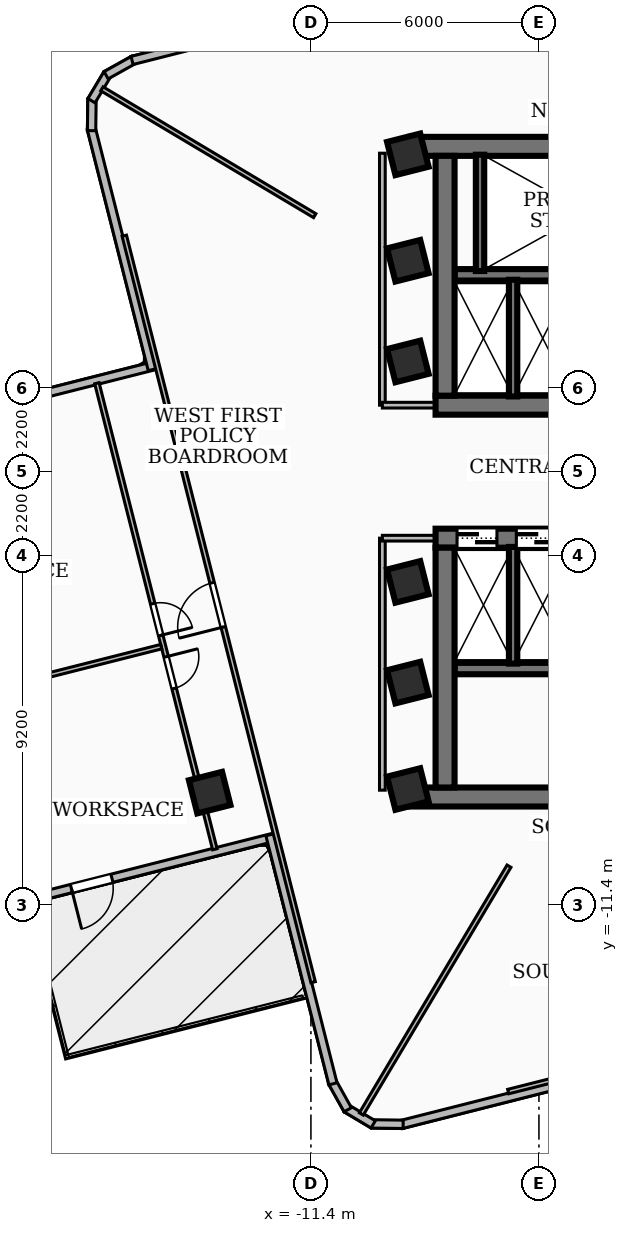
"""IFC4 building model, lengths in metres.
Left out: names, types, materials, properties, quantities, classifications, styles, units other than length and angle.
Written with IfcOpenShell. Run it as: python <this file> out.ifc"""

import sys

from ifc_helpers import new_model, si_unit, direction, frame, frame_2d, origin, origin_2d, place, context, subcontext, project, spatial, rectangle, extrude, element, fill, save


model = new_model("IFC4")
c1 = context("Model", 3, precision=1e-05, world=origin(), true_north=direction((0.0, 1.0)))
c2 = subcontext(c1, "Body", "Model", "MODEL_VIEW")
j1 = project(units=[si_unit("LENGTHUNIT", "METRE"), si_unit("PLANEANGLEUNIT", "RADIAN")], contexts=[c1])
p1 = place(None, origin())
s1 = spatial("IfcSite", under=j1, at=p1, CompositionType="ELEMENT")
p2 = place(p1, origin())
s2 = spatial("IfcBuilding", under=s1, at=p2, CompositionType="ELEMENT")
p3 = place(p2, frame((0.0, 0.0, 130.68)))
s3 = spatial("IfcBuildingStorey", under=s2, at=p3, CompositionType="ELEMENT", Elevation=130.68)
p4 = place(p3, frame((-8.78, 8.56, 0.0), z_axis=(0.0, 0.0, 1.0), x_axis=(1.0, 0.0, 0.0)))
e1 = element("IfcWall", 1, at=p4, inside=s3, PredefinedType="SHEAR", context=c2, shape_type="SweptSolid", body=[
    extrude(rectangle(XDim=17.56, YDim=0.5, at=frame_2d((8.78, 0.0))), origin(), (0.0, 0.0, 1.0), 3.32),
])
p5 = place(p3, frame((8.12, 1.75, 0.0), z_axis=(0.0, 0.0, 1.0), x_axis=(-1.0, 0.0, 0.0)))
e2 = element("IfcWall", 2, at=p5, inside=s3, PredefinedType="SHEAR", context=c2, shape_type="SweptSolid", body=[
    extrude(rectangle(XDim=16.24, YDim=0.5, at=frame_2d((8.12, 0.0))), origin(), (0.0, 0.0, 1.0), 3.32),
])
p6 = place(p5, frame((7.45, 0.0, 0.0)))
e3 = element("IfcOpeningElement", 3, at=p6, cuts=e2, PredefinedType="OPENING", context=c2, shape_type="SweptSolid", body=[
    extrude(rectangle(XDim=1.0, YDim=2.1, at=frame_2d((0.5, 1.05))), frame((0.0, 0.26, 0.0), z_axis=(0.0, -1.0, 0.0), x_axis=(1.0, 0.0, 0.0)), (0.0, 0.0, 1.0), 0.52),
])
p7 = place(p5, frame((3.85, 0.0, 0.0)))
e4 = element("IfcOpeningElement", 4, at=p7, cuts=e2, PredefinedType="OPENING", context=c2, shape_type="SweptSolid", body=[
    extrude(rectangle(XDim=0.9, YDim=2.06, at=frame_2d((0.45, 1.03))), frame((0.0, 0.26, 0.0), z_axis=(0.0, -1.0, 0.0), x_axis=(1.0, 0.0, 0.0)), (0.0, 0.0, 1.0), 0.52),
])
p8 = place(p5, frame((2.35, 0.0, 0.0)))
e5 = element("IfcOpeningElement", 5, at=p8, cuts=e2, PredefinedType="OPENING", context=c2, shape_type="SweptSolid", body=[
    extrude(rectangle(XDim=0.9, YDim=2.06, at=frame_2d((0.45, 1.03))), frame((0.0, 0.26, 0.0), z_axis=(0.0, -1.0, 0.0), x_axis=(1.0, 0.0, 0.0)), (0.0, 0.0, 1.0), 0.52),
])
p9 = place(p5, frame((0.8, 0.0, 0.0)))
e6 = element("IfcOpeningElement", 6, at=p9, cuts=e2, PredefinedType="OPENING", context=c2, shape_type="SweptSolid", body=[
    extrude(rectangle(XDim=0.9, YDim=2.06, at=frame_2d((0.45, 1.03))), frame((0.0, 0.26, 0.0), z_axis=(0.0, -1.0, 0.0), x_axis=(1.0, 0.0, 0.0)), (0.0, 0.0, 1.0), 0.52),
])
p10 = place(p3, frame((-7.87, 2.0, 0.0), z_axis=(0.0, 0.0, 1.0), x_axis=(0.0, 1.0, 0.0)))
e7 = element("IfcWall", 7, at=p10, inside=s3, PredefinedType="SHEAR", context=c2, shape_type="SweptSolid", body=[
    extrude(rectangle(XDim=6.31, YDim=0.5, at=frame_2d((3.155, 0.0))), origin(), (0.0, 0.0, 1.0), 3.32),
])
p11 = place(p3, frame((7.62, 5.18, 0.0), z_axis=(0.0, 0.0, 1.0), x_axis=(-1.0, 0.0, 0.0)))
e8 = element("IfcWall", 8, at=p11, inside=s3, PredefinedType="SOLIDWALL", context=c2, shape_type="SweptSolid", body=[
    extrude(rectangle(XDim=15.24, YDim=0.3, at=frame_2d((7.62, 0.0))), origin(), (0.0, 0.0, 1.0), 3.32),
])
p12 = place(p11, frame((5.77, 0.0, 0.0)))
e9 = element("IfcOpeningElement", 9, at=p12, cuts=e8, PredefinedType="OPENING", context=c2, shape_type="SweptSolid", body=[
    extrude(rectangle(XDim=1.1, YDim=2.15, at=frame_2d((0.55, 1.075))), frame((0.0, 0.16, 0.0), z_axis=(0.0, -1.0, 0.0), x_axis=(1.0, 0.0, 0.0)), (0.0, 0.0, 1.0), 0.32),
])
p13 = place(p11, frame((2.97, 0.0, 0.0)))
e10 = element("IfcOpeningElement", 10, at=p13, cuts=e8, PredefinedType="OPENING", context=c2, shape_type="SweptSolid", body=[
    extrude(rectangle(XDim=1.1, YDim=2.15, at=frame_2d((0.55, 1.075))), frame((0.0, 0.16, 0.0), z_axis=(0.0, -1.0, 0.0), x_axis=(1.0, 0.0, 0.0)), (0.0, 0.0, 1.0), 0.32),
])
p14 = place(p11, frame((7.97, 0.0, 0.0)))
e11 = element("IfcOpeningElement", 11, at=p14, cuts=e8, PredefinedType="OPENING", context=c2, shape_type="SweptSolid", body=[
    extrude(rectangle(XDim=1.0, YDim=2.1, at=frame_2d((0.5, 1.05))), frame((0.0, 0.16, 0.0), z_axis=(0.0, -1.0, 0.0), x_axis=(1.0, 0.0, 0.0)), (0.0, 0.0, 1.0), 0.32),
])
p15 = place(p3, frame((8.78, -8.56, 0.0), z_axis=(0.0, 0.0, 1.0), x_axis=(-1.0, 0.0, 0.0)))
e12 = element("IfcWall", 12, at=p15, inside=s3, PredefinedType="SHEAR", context=c2, shape_type="SweptSolid", body=[
    extrude(rectangle(XDim=17.56, YDim=0.5, at=frame_2d((8.78, 0.0))), origin(), (0.0, 0.0, 1.0), 3.32),
])
p16 = place(p3, frame((-8.12, -1.75, 0.0), z_axis=(0.0, 0.0, 1.0), x_axis=(1.0, 0.0, 0.0)))
e13 = element("IfcWall", 13, at=p16, inside=s3, PredefinedType="SHEAR", context=c2, shape_type="SweptSolid", body=[
    extrude(rectangle(XDim=16.24, YDim=0.5, at=frame_2d((8.12, 0.0))), origin(), (0.0, 0.0, 1.0), 3.32),
])
p17 = place(p16, frame((7.45, 0.0, 0.0)))
e14 = element("IfcOpeningElement", 14, at=p17, cuts=e13, PredefinedType="OPENING", context=c2, shape_type="SweptSolid", body=[
    extrude(rectangle(XDim=1.0, YDim=2.1, at=frame_2d((0.5, 1.05))), frame((0.0, 0.26, 0.0), z_axis=(0.0, -1.0, 0.0), x_axis=(1.0, 0.0, 0.0)), (0.0, 0.0, 1.0), 0.52),
])
p18 = place(p16, frame((12.65, 0.0, 0.0)))
e15 = element("IfcOpeningElement", 15, at=p18, cuts=e13, PredefinedType="OPENING", context=c2, shape_type="SweptSolid", body=[
    extrude(rectangle(XDim=0.9, YDim=2.06, at=frame_2d((0.45, 1.03))), frame((0.0, 0.26, 0.0), z_axis=(0.0, -1.0, 0.0), x_axis=(1.0, 0.0, 0.0)), (0.0, 0.0, 1.0), 0.52),
])
p19 = place(p16, frame((0.565, 0.0, 0.0)))
e16 = element("IfcOpeningElement", 16, at=p19, cuts=e13, PredefinedType="OPENING", context=c2, shape_type="SweptSolid", body=[
    extrude(rectangle(XDim=1.05, YDim=2.15, at=frame_2d((0.525, 1.075))), frame((0.0, 0.26, 0.0), z_axis=(0.0, -1.0, 0.0), x_axis=(1.0, 0.0, 0.0)), (0.0, 0.0, 1.0), 0.52),
])
p20 = place(p16, frame((2.125, 0.0, 0.0)))
e17 = element("IfcOpeningElement", 17, at=p20, cuts=e13, PredefinedType="OPENING", context=c2, shape_type="SweptSolid", body=[
    extrude(rectangle(XDim=1.05, YDim=2.15, at=frame_2d((0.525, 1.075))), frame((0.0, 0.26, 0.0), z_axis=(0.0, -1.0, 0.0), x_axis=(1.0, 0.0, 0.0)), (0.0, 0.0, 1.0), 0.52),
])
p21 = place(p16, frame((3.685, 0.0, 0.0)))
e18 = element("IfcOpeningElement", 18, at=p21, cuts=e13, PredefinedType="OPENING", context=c2, shape_type="SweptSolid", body=[
    extrude(rectangle(XDim=1.05, YDim=2.15, at=frame_2d((0.525, 1.075))), frame((0.0, 0.26, 0.0), z_axis=(0.0, -1.0, 0.0), x_axis=(1.0, 0.0, 0.0)), (0.0, 0.0, 1.0), 0.52),
])
p22 = place(p3, frame((-7.87, -8.31, 0.0), z_axis=(0.0, 0.0, 1.0), x_axis=(0.0, 1.0, 0.0)))
e19 = element("IfcWall", 19, at=p22, inside=s3, PredefinedType="SHEAR", context=c2, shape_type="SweptSolid", body=[
    extrude(rectangle(XDim=6.31, YDim=0.5, at=frame_2d((3.155, 0.0))), origin(), (0.0, 0.0, 1.0), 3.32),
])
p23 = place(p3, frame((-7.62, -5.18, 0.0), z_axis=(0.0, 0.0, 1.0), x_axis=(1.0, 0.0, 0.0)))
e20 = element("IfcWall", 20, at=p23, inside=s3, PredefinedType="SOLIDWALL", context=c2, shape_type="SweptSolid", body=[
    extrude(rectangle(XDim=15.24, YDim=0.3, at=frame_2d((7.62, 0.0))), origin(), (0.0, 0.0, 1.0), 3.32),
])
p24 = place(p23, frame((5.77, 0.0, 0.0)))
e21 = element("IfcOpeningElement", 21, at=p24, cuts=e20, PredefinedType="OPENING", context=c2, shape_type="SweptSolid", body=[
    extrude(rectangle(XDim=1.1, YDim=2.15, at=frame_2d((0.55, 1.075))), frame((0.0, 0.16, 0.0), z_axis=(0.0, -1.0, 0.0), x_axis=(1.0, 0.0, 0.0)), (0.0, 0.0, 1.0), 0.32),
])
p25 = place(p23, frame((7.97, 0.0, 0.0)))
e22 = element("IfcOpeningElement", 22, at=p25, cuts=e20, PredefinedType="OPENING", context=c2, shape_type="SweptSolid", body=[
    extrude(rectangle(XDim=1.0, YDim=2.1, at=frame_2d((0.5, 1.05))), frame((0.0, 0.16, 0.0), z_axis=(0.0, -1.0, 0.0), x_axis=(1.0, 0.0, 0.0)), (0.0, 0.0, 1.0), 0.32),
])
p26 = place(p3, frame((-6.95, 5.28, 0.0), z_axis=(0.0, 0.0, 1.0), x_axis=(0.0, 1.0, 0.0)))
e23 = element("IfcWall", 23, at=p26, inside=s3, PredefinedType="SOLIDWALL", context=c2, shape_type="SweptSolid", body=[
    extrude(rectangle(XDim=3.06, YDim=0.22, at=frame_2d((1.53, 0.0))), origin(), (0.0, 0.0, 1.0), 3.32),
])
for number, where, z_axis, x_axis in (
    (24, (-6.08, 1.98, 0.0), (0.0, 0.0, 1.0), (0.0, 1.0, 0.0)),
    (25, (-6.08, -5.05, 0.0), (0.0, 0.0, 1.0), (0.0, 1.0, 0.0)),
):
    element("IfcWall", number, at=place(p3, frame(where, z_axis=z_axis, x_axis=x_axis)), inside=s3, PredefinedType="SOLIDWALL", context=c2, shape_type="SweptSolid", body=[
        extrude(rectangle(XDim=3.07, YDim=0.22, at=frame_2d((1.535, 0.0))), origin(), (0.0, 0.0, 1.0), 3.32),
    ])
for number, where, z_axis, x_axis in (
    (26, (-8.85, -5.55, 0.0), (0.0, 0.0, 1.0), (0.969, 0.245, 0.0)),
    (27, (-8.85, -2.9, 0.0), (0.0, 0.0, 1.0), (0.969, 0.245, 0.0)),
    (28, (-8.85, 2.9, 0.0), (0.0, 0.0, 1.0), (0.969, 0.245, 0.0)),
    (29, (-8.85, 5.55, 0.0), (0.0, 0.0, 1.0), (0.969, 0.245, 0.0)),
    (30, (-8.85, 8.35, 0.0), (0.0, 0.0, 1.0), (0.969, 0.245, 0.0)),
    (31, (-8.85, -8.35, 0.0), (0.0, 0.0, 1.0), (0.969, 0.245, 0.0)),
    (32, (-14.064, -8.445, 0.0), (0.0, 0.0, 1.0), (0.969, 0.245, 0.0)),
):
    element("IfcColumn", number, at=place(p3, frame(where, z_axis=z_axis, x_axis=x_axis)), inside=s3, PredefinedType="COLUMN", context=c2, shape_type="SweptSolid", body=[
        extrude(rectangle(XDim=0.9, YDim=0.9, at=origin_2d()), origin(), (0.0, 0.0, 1.0), 3.6),
    ])
p27 = place(p3, frame((-12.371, -9.618, 0.0), z_axis=(0.0, 0.0, 1.0), x_axis=(-0.969434127448, -0.245351732293, 0.0)))
e33 = element("IfcWall", 33, at=p27, inside=s3, PredefinedType="SOLIDWALL", context=c2, shape_type="SweptSolid", body=[
    extrude(rectangle(XDim=13.458, YDim=0.22, at=frame_2d((6.729, 0.0))), origin(), (0.0, 0.0, 1.0), 3.32),
])
p28 = place(p27, frame((4.4, 0.0, 0.0)))
e34 = element("IfcOpeningElement", 34, at=p28, cuts=e33, PredefinedType="OPENING", context=c2, shape_type="SweptSolid", body=[
    extrude(rectangle(XDim=1.1, YDim=2.1, at=frame_2d((0.55, 1.05))), frame((0.0, 0.12, 0.0), z_axis=(0.0, -1.0, 0.0), x_axis=(1.0, 0.0, 0.0)), (0.0, 0.0, 1.0), 0.24),
])
p29 = place(p3, frame((-28.557, -0.511, 0.0), z_axis=(0.0, 0.0, 1.0), x_axis=(0.969429758912, 0.245368992613, 0.0)))
e35 = element("IfcWall", 35, at=p29, inside=s3, PredefinedType="SOLIDWALL", context=c2, shape_type="SweptSolid", body=[
    extrude(rectangle(XDim=13.457, YDim=0.22, at=frame_2d((6.729, 0.0))), origin(), (0.0, 0.0, 1.0), 3.32),
])
p30 = place(p29, frame((1.1, 0.0, 0.85)))
e36 = element("IfcOpeningElement", 36, at=p30, cuts=e35, PredefinedType="OPENING", context=c2, shape_type="SweptSolid", body=[
    extrude(rectangle(XDim=2.4, YDim=2.1, at=frame_2d((1.2, 1.05))), frame((0.0, 0.12, 0.0), z_axis=(0.0, -1.0, 0.0), x_axis=(1.0, 0.0, 0.0)), (0.0, 0.0, 1.0), 0.24),
])
p31 = place(p3, frame((-15.574, 2.684, 0.0), z_axis=(0.0, 0.0, 1.0), x_axis=(-0.245346347134, 0.969435490349, 0.0)))
e37 = element("IfcWall", 37, at=p31, inside=s3, PredefinedType="SOLIDWALL", context=c2, shape_type="SweptSolid", body=[
    extrude(rectangle(XDim=6.538, YDim=0.22, at=frame_2d((3.269, 0.0))), origin(), (0.0, 0.0, 1.0), 3.32),
])
p32 = place(p3, frame((-17.172, 8.973, 0.0), z_axis=(0.0, 0.0, 1.0), x_axis=(0.013464821393, 0.999909345183, 0.0)))
e38 = element("IfcWall", 38, at=p32, inside=s3, PredefinedType="SOLIDWALL", context=c2, shape_type="SweptSolid", body=[
    extrude(rectangle(XDim=0.834, YDim=0.22, at=frame_2d((0.417, 0.0))), origin(), (0.0, 0.0, 1.0), 3.32),
])
p33 = place(p3, frame((-17.174, 9.761, 0.0), z_axis=(0.0, 0.0, 1.0), x_axis=(0.512960801038, 0.858412031951, 0.0)))
e39 = element("IfcWall", 39, at=p33, inside=s3, PredefinedType="SOLIDWALL", context=c2, shape_type="SweptSolid", body=[
    extrude(rectangle(XDim=0.819, YDim=0.22, at=frame_2d((0.41, 0.0))), origin(), (0.0, 0.0, 1.0), 3.32),
])
p34 = place(p3, frame((-16.789, 10.431, 0.0), z_axis=(0.0, 0.0, 1.0), x_axis=(0.872870149311, 0.487952561671, 0.0)))
e40 = element("IfcWall", 40, at=p34, inside=s3, PredefinedType="SOLIDWALL", context=c2, shape_type="SweptSolid", body=[
    extrude(rectangle(XDim=0.834, YDim=0.22, at=frame_2d((0.417, 0.0))), origin(), (0.0, 0.0, 1.0), 3.32),
])
p35 = place(p3, frame((-16.107, 10.82, 0.0), z_axis=(0.0, 0.0, 1.0), x_axis=(0.969443674581, 0.245314006561, 0.0)))
e41 = element("IfcWall", 41, at=p35, inside=s3, PredefinedType="SOLIDWALL", context=c2, shape_type="SweptSolid", body=[
    extrude(rectangle(XDim=6.759, YDim=0.22, at=frame_2d((3.379, 0.0))), origin(), (0.0, 0.0, 1.0), 3.32),
])
p36 = place(p3, frame((-2.684, -15.574, 0.0), z_axis=(0.0, 0.0, 1.0), x_axis=(-0.969435490349, -0.245346347134, 0.0)))
e42 = element("IfcWall", 42, at=p36, inside=s3, PredefinedType="SOLIDWALL", context=c2, shape_type="SweptSolid", body=[
    extrude(rectangle(XDim=6.538, YDim=0.22, at=frame_2d((3.269, 0.0))), origin(), (0.0, 0.0, 1.0), 2.55),
])
p37 = place(p3, frame((-8.973, -17.172, 0.0), z_axis=(0.0, 0.0, 1.0), x_axis=(-0.999909345183, 0.013464821393, 0.0)))
e43 = element("IfcWall", 43, at=p37, inside=s3, PredefinedType="SOLIDWALL", context=c2, shape_type="SweptSolid", body=[
    extrude(rectangle(XDim=0.834, YDim=0.22, at=frame_2d((0.417, 0.0))), origin(), (0.0, 0.0, 1.0), 3.32),
])
p38 = place(p3, frame((-9.761, -17.174, 0.0), z_axis=(0.0, 0.0, 1.0), x_axis=(-0.858412031951, 0.512960801038, 0.0)))
e44 = element("IfcWall", 44, at=p38, inside=s3, PredefinedType="SOLIDWALL", context=c2, shape_type="SweptSolid", body=[
    extrude(rectangle(XDim=0.819, YDim=0.22, at=frame_2d((0.41, 0.0))), origin(), (0.0, 0.0, 1.0), 3.32),
])
p39 = place(p3, frame((-10.431, -16.789, 0.0), z_axis=(0.0, 0.0, 1.0), x_axis=(-0.487952561671, 0.872870149311, 0.0)))
e45 = element("IfcWall", 45, at=p39, inside=s3, PredefinedType="SOLIDWALL", context=c2, shape_type="SweptSolid", body=[
    extrude(rectangle(XDim=0.834, YDim=0.22, at=frame_2d((0.417, 0.0))), origin(), (0.0, 0.0, 1.0), 3.32),
])
p40 = place(p3, frame((-10.82, -16.107, 0.0), z_axis=(0.0, 0.0, 1.0), x_axis=(-0.245314006561, 0.969443674581, 0.0)))
e46 = element("IfcWall", 46, at=p40, inside=s3, PredefinedType="SOLIDWALL", context=c2, shape_type="SweptSolid", body=[
    extrude(rectangle(XDim=6.759, YDim=0.22, at=frame_2d((3.379, 0.0))), origin(), (0.0, 0.0, 1.0), 3.32),
])
p41 = place(p3, frame((-9.52, 1.75, 0.0), z_axis=(0.0, 0.0, 1.0), x_axis=(0.0, 1.0, 0.0)))
e47 = element("IfcWall", 47, at=p41, inside=s3, PredefinedType="PARTITIONING", context=c2, shape_type="SweptSolid", body=[
    extrude(rectangle(XDim=6.63, YDim=0.15, at=frame_2d((3.315, 0.0))), origin(), (0.0, 0.0, 1.0), 2.55),
])
p42 = place(p3, frame((-7.85, 1.75, 0.0), z_axis=(0.0, 0.0, 1.0), x_axis=(-1.0, 0.0, 0.0)))
e48 = element("IfcWall", 48, at=p42, inside=s3, PredefinedType="PARTITIONING", context=c2, shape_type="SweptSolid", body=[
    extrude(rectangle(XDim=1.67, YDim=0.15, at=frame_2d((0.835, 0.0))), origin(), (0.0, 0.0, 1.0), 2.55),
])
p43 = place(p3, frame((-9.52, -8.38, 0.0), z_axis=(0.0, 0.0, 1.0), x_axis=(0.0, 1.0, 0.0)))
e49 = element("IfcWall", 49, at=p43, inside=s3, PredefinedType="PARTITIONING", context=c2, shape_type="SweptSolid", body=[
    extrude(rectangle(XDim=6.63, YDim=0.15, at=frame_2d((3.315, 0.0))), origin(), (0.0, 0.0, 1.0), 2.55),
])
p44 = place(p3, frame((-7.85, -1.75, 0.0), z_axis=(0.0, 0.0, 1.0), x_axis=(-1.0, 0.0, 0.0)))
e50 = element("IfcWall", 50, at=p44, inside=s3, PredefinedType="PARTITIONING", context=c2, shape_type="SweptSolid", body=[
    extrude(rectangle(XDim=1.67, YDim=0.15, at=frame_2d((0.835, 0.0))), origin(), (0.0, 0.0, 1.0), 2.55),
])
p45 = place(p3, frame((-11.3, 6.736, 0.0), z_axis=(0.0, 0.0, 1.0), x_axis=(-0.858979599017, 0.512009812868, 0.0)))
e51 = element("IfcWall", 51, at=p45, inside=s3, PredefinedType="PARTITIONING", context=c2, shape_type="SweptSolid", body=[
    extrude(rectangle(XDim=6.519, YDim=0.12, at=frame_2d((3.26, 0.0))), origin(), (0.0, 0.0, 1.0), 3.32),
])
p46 = place(p3, frame((-6.188, -10.38, 0.0), z_axis=(0.0, 0.0, 1.0), x_axis=(-0.511972353143, -0.859001926434, 0.0)))
e52 = element("IfcWall", 52, at=p46, inside=s3, PredefinedType="PARTITIONING", context=c2, shape_type="SweptSolid", body=[
    extrude(rectangle(XDim=7.59, YDim=0.12, at=frame_2d((3.795, 0.0))), origin(), (0.0, 0.0, 1.0), 2.55),
])
p47 = place(p3, frame((-11.342, -13.433, 0.0), z_axis=(0.0, 0.0, 1.0), x_axis=(-0.24525085526, 0.969459652587, 0.0)))
e53 = element("IfcWall", 53, at=p47, inside=s3, PredefinedType="PARTITIONING", context=c2, shape_type="SweptSolid", body=[
    extrude(rectangle(XDim=20.261, YDim=0.12, at=frame_2d((10.13, 0.0))), origin(), (0.0, 0.0, 1.0), 2.55),
])
p48 = place(p47, frame((9.64, 0.0, 0.0)))
e54 = element("IfcOpeningElement", 54, at=p48, cuts=e53, PredefinedType="OPENING", context=c2, shape_type="SweptSolid", body=[
    extrude(rectangle(XDim=1.2, YDim=2.1, at=frame_2d((0.6, 1.05))), frame((0.0, 0.07, 0.0), z_axis=(0.0, -1.0, 0.0), x_axis=(1.0, 0.0, 0.0)), (0.0, 0.0, 1.0), 0.14),
])
p49 = place(p3, frame((-15.339, -4.604, 0.0), z_axis=(0.0, 0.0, 1.0), x_axis=(-0.969461701565, -0.245242755651, 0.0)))
e55 = element("IfcWall", 55, at=p49, inside=s3, PredefinedType="PARTITIONING", context=c2, shape_type="SweptSolid", body=[
    extrude(rectangle(XDim=13.215, YDim=0.12, at=frame_2d((6.608, 0.0))), origin(), (0.0, 0.0, 1.0), 2.7),
])
p50 = place(p3, frame((-17.032, 2.328, 0.0), z_axis=(0.0, 0.0, 1.0), x_axis=(0.245381918011, -0.969426487318, 0.0)))
e56 = element("IfcWall", 56, at=p50, inside=s3, PredefinedType="PARTITIONING", context=c2, shape_type="SweptSolid", body=[
    extrude(rectangle(XDim=12.65, YDim=0.12, at=frame_2d((6.325, 0.0))), origin(), (0.0, 0.0, 1.0), 2.55),
])
p51 = place(p50, frame((5.985, 0.0, 0.0)))
e57 = element("IfcOpeningElement", 57, at=p51, cuts=e56, PredefinedType="OPENING", context=c2, shape_type="SweptSolid", body=[
    extrude(rectangle(XDim=0.86, YDim=2.04, at=frame_2d((0.43, 1.02))), frame((0.0, 0.07, 0.0), z_axis=(0.0, -1.0, 0.0), x_axis=(1.0, 0.0, 0.0)), (0.0, 0.0, 1.0), 0.14),
])
p52 = place(p50, frame((7.425, 0.0, 0.0)))
e58 = element("IfcOpeningElement", 58, at=p52, cuts=e56, PredefinedType="OPENING", context=c2, shape_type="SweptSolid", body=[
    extrude(rectangle(XDim=0.86, YDim=2.04, at=frame_2d((0.43, 1.02))), frame((0.0, 0.07, 0.0), z_axis=(0.0, -1.0, 0.0), x_axis=(1.0, 0.0, 0.0)), (0.0, 0.0, 1.0), 0.14),
])
p53 = place(p3, frame((13.433, -11.342, 0.0), z_axis=(0.0, 0.0, 1.0), x_axis=(-0.969459652587, -0.24525085526, 0.0)))
e59 = element("IfcWall", 59, at=p53, inside=s3, PredefinedType="PARTITIONING", context=c2, shape_type="SweptSolid", body=[
    extrude(rectangle(XDim=20.261, YDim=0.12, at=frame_2d((10.13, 0.0))), origin(), (0.0, 0.0, 1.0), 2.55),
])
p54 = place(p53, frame((9.64, 0.0, 0.0)))
e60 = element("IfcOpeningElement", 60, at=p54, cuts=e59, PredefinedType="OPENING", context=c2, shape_type="SweptSolid", body=[
    extrude(rectangle(XDim=1.2, YDim=2.1, at=frame_2d((0.6, 1.05))), frame((0.0, 0.07, 0.0), z_axis=(0.0, -1.0, 0.0), x_axis=(1.0, 0.0, 0.0)), (0.0, 0.0, 1.0), 0.14),
])
p55 = place(p28, origin())
e61 = element("IfcDoor", 61, at=p55, inside=s3, OperationType="SINGLE_SWING_RIGHT", PredefinedType="DOOR", context=c2, shape_type="SweptSolid", body=[
    extrude(rectangle(XDim=1.1, YDim=2.1, at=frame_2d((0.55, 1.05))), frame((0.0, 0.025, 0.0), z_axis=(0.0, -1.0, 0.0), x_axis=(1.0, 0.0, 0.0)), (0.0, 0.0, 1.0), 0.05),
])
fill(e34, e61)
p56 = place(p19, origin())
e62 = element("IfcDoor", 62, at=p56, inside=s3, OperationType="DOUBLE_DOOR_SLIDING", PredefinedType="DOOR", context=c2, shape_type="SweptSolid", body=[
    extrude(rectangle(XDim=1.05, YDim=2.15, at=frame_2d((0.525, 1.075))), frame((0.0, 0.025, 0.0), z_axis=(0.0, -1.0, 0.0), x_axis=(1.0, 0.0, 0.0)), (0.0, 0.0, 1.0), 0.05),
])
fill(e16, e62)
p57 = place(p20, origin())
e63 = element("IfcDoor", 63, at=p57, inside=s3, OperationType="DOUBLE_DOOR_SLIDING", PredefinedType="DOOR", context=c2, shape_type="SweptSolid", body=[
    extrude(rectangle(XDim=1.05, YDim=2.15, at=frame_2d((0.525, 1.075))), frame((0.0, 0.025, 0.0), z_axis=(0.0, -1.0, 0.0), x_axis=(1.0, 0.0, 0.0)), (0.0, 0.0, 1.0), 0.05),
])
fill(e17, e63)
p58 = place(p48, origin())
e64 = element("IfcDoor", 64, at=p58, inside=s3, OperationType="SINGLE_SWING_LEFT", PredefinedType="DOOR", context=c2, shape_type="SweptSolid", body=[
    extrude(rectangle(XDim=1.2, YDim=2.1, at=frame_2d((0.6, 1.05))), frame((0.0, 0.025, 0.0), z_axis=(0.0, -1.0, 0.0), x_axis=(1.0, 0.0, 0.0)), (0.0, 0.0, 1.0), 0.05),
])
fill(e54, e64)
p59 = place(p51, origin())
e65 = element("IfcDoor", 65, at=p59, inside=s3, OperationType="SINGLE_SWING_RIGHT", PredefinedType="DOOR", context=c2, shape_type="SweptSolid", body=[
    extrude(rectangle(XDim=0.86, YDim=2.04, at=frame_2d((0.43, 1.02))), frame((0.0, 0.025, 0.0), z_axis=(0.0, -1.0, 0.0), x_axis=(1.0, 0.0, 0.0)), (0.0, 0.0, 1.0), 0.05),
])
fill(e57, e65)
p60 = place(p52, origin())
e66 = element("IfcDoor", 66, at=p60, inside=s3, OperationType="SINGLE_SWING_LEFT", PredefinedType="DOOR", context=c2, shape_type="SweptSolid", body=[
    extrude(rectangle(XDim=0.86, YDim=2.04, at=frame_2d((0.43, 1.02))), frame((0.0, 0.025, 0.0), z_axis=(0.0, -1.0, 0.0), x_axis=(1.0, 0.0, 0.0)), (0.0, 0.0, 1.0), 0.05),
])
fill(e58, e66)
save(model, sys.argv[1])
